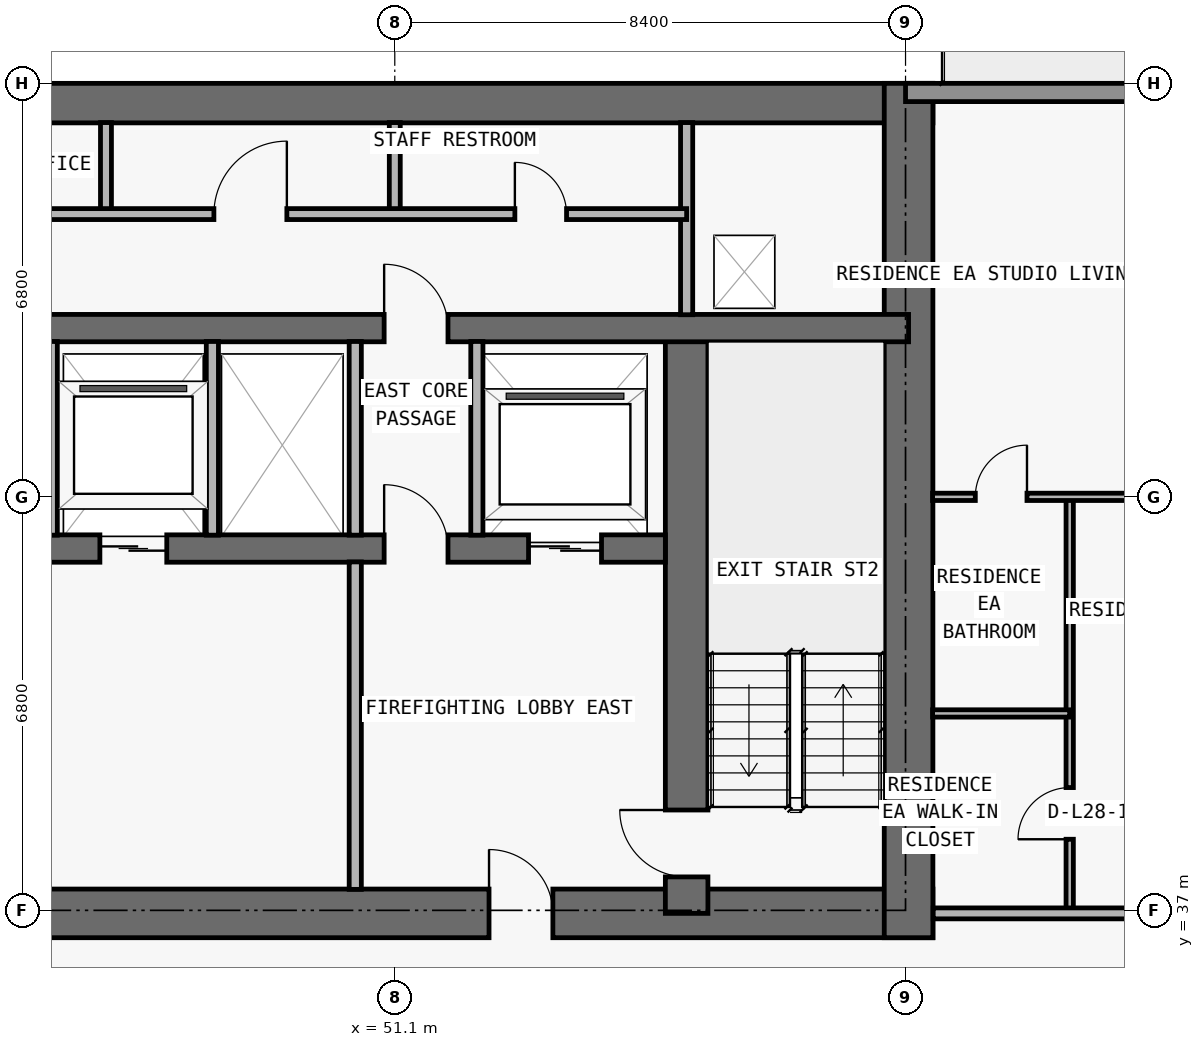
"""IFC4 building model, lengths in metres.
Left out: names, types, materials, properties, quantities, classifications, styles, units other than length and angle.
Written with IfcOpenShell. Run it as: python <this file> out.ifc"""

import sys

from ifc_helpers import new_model, si_unit, direction, frame, frame_2d, origin, place, context, subcontext, project, spatial, rectangle, extrude, element, fill, save


model = new_model("IFC4")
c1 = context("Model", 3, precision=1e-05, world=origin(), true_north=direction((0.0, 1.0)))
c2 = subcontext(c1, "Body", "Model", "MODEL_VIEW")
j1 = project(units=[si_unit("LENGTHUNIT", "METRE"), si_unit("PLANEANGLEUNIT", "RADIAN")], contexts=[c1])
p1 = place(None, origin())
s1 = spatial("IfcSite", under=j1, at=p1, CompositionType="ELEMENT")
p2 = place(p1, origin())
s2 = spatial("IfcBuilding", under=s1, at=p2, CompositionType="ELEMENT")
p3 = place(p2, frame((0.0, 0.0, 105.9)))
s3 = spatial("IfcBuildingStorey", under=s2, at=p3, CompositionType="ELEMENT", Elevation=105.9)
p4 = place(p3, frame((17.85, 36.95, 0.0), z_axis=(0.0, 0.0, 1.0), x_axis=(1.0, 0.0, 0.0)))
e1 = element("IfcWall", 1, at=p4, inside=s3, PredefinedType="SHEAR", context=c2, shape_type="SweptSolid", body=[
    extrude(rectangle(XDim=42.1, YDim=0.8, at=frame_2d((21.05, 0.0))), origin(), (0.0, 0.0, 1.0), 3.05),
])
p5 = place(p4, frame((14.45, 0.0, 0.0)))
e2 = element("IfcOpeningElement", 2, at=p5, cuts=e1, PredefinedType="OPENING", context=c2, shape_type="SweptSolid", body=[
    extrude(rectangle(XDim=1.1, YDim=2.15, at=frame_2d((0.55, 1.075))), frame((0.0, 0.41, 0.0), z_axis=(0.0, -1.0, 0.0), x_axis=(1.0, 0.0, 0.0)), (0.0, 0.0, 1.0), 0.82),
])
p6 = place(p4, frame((6.3, 0.0, 0.0)))
e3 = element("IfcOpeningElement", 3, at=p6, cuts=e1, PredefinedType="OPENING", context=c2, shape_type="SweptSolid", body=[
    extrude(rectangle(XDim=1.05, YDim=2.15, at=frame_2d((0.525, 1.075))), frame((0.0, 0.41, 0.0), z_axis=(0.0, -1.0, 0.0), x_axis=(1.0, 0.0, 0.0)), (0.0, 0.0, 1.0), 0.82),
])
p7 = place(p4, frame((34.8, 0.0, 0.0)))
e4 = element("IfcOpeningElement", 4, at=p7, cuts=e1, PredefinedType="OPENING", context=c2, shape_type="SweptSolid", body=[
    extrude(rectangle(XDim=1.05, YDim=2.15, at=frame_2d((0.525, 1.075))), frame((0.0, 0.41, 0.0), z_axis=(0.0, -1.0, 0.0), x_axis=(1.0, 0.0, 0.0)), (0.0, 0.0, 1.0), 0.82),
])
p8 = place(p4, frame((10.913, 0.0, 0.0)))
e5 = element("IfcOpeningElement", 5, at=p8, cuts=e1, PredefinedType="OPENING", context=c2, shape_type="SweptSolid", body=[
    extrude(rectangle(XDim=1.05, YDim=2.15, at=frame_2d((0.525, 1.075))), frame((0.0, 0.41, 0.0), z_axis=(0.0, -1.0, 0.0), x_axis=(1.0, 0.0, 0.0)), (0.0, 0.0, 1.0), 0.82),
])
p9 = place(p4, frame((24.15, 0.0, 0.0)))
e6 = element("IfcOpeningElement", 6, at=p9, cuts=e1, PredefinedType="OPENING", context=c2, shape_type="SweptSolid", body=[
    extrude(rectangle(XDim=1.05, YDim=2.15, at=frame_2d((0.525, 1.075))), frame((0.0, 0.41, 0.0), z_axis=(0.0, -1.0, 0.0), x_axis=(1.0, 0.0, 0.0)), (0.0, 0.0, 1.0), 0.82),
])
p10 = place(p3, frame((17.85, 50.275, 0.0), z_axis=(0.0, 0.0, 1.0), x_axis=(1.0, 0.0, 0.0)))
e7 = element("IfcWall", 7, at=p10, inside=s3, PredefinedType="SHEAR", context=c2, shape_type="SweptSolid", body=[
    extrude(rectangle(XDim=42.1, YDim=0.65, at=frame_2d((21.05, 0.0))), origin(), (0.0, 0.0, 1.0), 3.05),
])
p11 = place(p3, frame((59.55, 36.55, 0.0), z_axis=(0.0, 0.0, 1.0), x_axis=(0.0, 1.0, 0.0)))
e8 = element("IfcWall", 8, at=p11, inside=s3, PredefinedType="SHEAR", context=c2, shape_type="SweptSolid", body=[
    extrude(rectangle(XDim=14.05, YDim=0.8, at=frame_2d((7.025, 0.0))), origin(), (0.0, 0.0, 1.0), 3.05),
])
p12 = place(p3, frame((55.9, 36.95, 0.0), z_axis=(0.0, 0.0, 1.0), x_axis=(0.0, 1.0, 0.0)))
e9 = element("IfcWall", 9, at=p12, inside=s3, PredefinedType="SHEAR", context=c2, shape_type="SweptSolid", body=[
    extrude(rectangle(XDim=9.625, YDim=0.7, at=frame_2d((4.812, 0.0))), origin(), (0.0, 0.0, 1.0), 3.05),
])
p13 = place(p12, frame((0.6, 0.0, 0.0)))
e10 = element("IfcOpeningElement", 10, at=p13, cuts=e9, PredefinedType="OPENING", context=c2, shape_type="SweptSolid", body=[
    extrude(rectangle(XDim=1.1, YDim=2.15, at=frame_2d((0.55, 1.075))), frame((0.0, 0.36, 0.0), z_axis=(0.0, -1.0, 0.0), x_axis=(1.0, 0.0, 0.0)), (0.0, 0.0, 1.0), 0.72),
])
p14 = place(p3, frame((22.25, 42.95, 0.0), z_axis=(0.0, 0.0, 1.0), x_axis=(1.0, 0.0, 0.0)))
e11 = element("IfcWall", 11, at=p14, inside=s3, PredefinedType="SHEAR", context=c2, shape_type="SweptSolid", body=[
    extrude(rectangle(XDim=33.3, YDim=0.45, at=frame_2d((16.65, 0.0))), origin(), (0.0, 0.0, 1.0), 3.05),
])
p15 = place(p14, frame((1.05, 0.0, 0.0)))
e12 = element("IfcOpeningElement", 12, at=p15, cuts=e11, PredefinedType="OPENING", context=c2, shape_type="SweptSolid", body=[
    extrude(rectangle(XDim=1.2, YDim=2.2, at=frame_2d((0.6, 1.1))), frame((0.0, 0.235, 0.0), z_axis=(0.0, -1.0, 0.0), x_axis=(1.0, 0.0, 0.0)), (0.0, 0.0, 1.0), 0.47),
])
p16 = place(p14, frame((31.05, 0.0, 0.0)))
e13 = element("IfcOpeningElement", 13, at=p16, cuts=e11, PredefinedType="OPENING", context=c2, shape_type="SweptSolid", body=[
    extrude(rectangle(XDim=1.2, YDim=2.2, at=frame_2d((0.6, 1.1))), frame((0.0, 0.235, 0.0), z_axis=(0.0, -1.0, 0.0), x_axis=(1.0, 0.0, 0.0)), (0.0, 0.0, 1.0), 0.47),
])
p17 = place(p14, frame((21.4, 0.0, 0.0)))
e14 = element("IfcOpeningElement", 14, at=p17, cuts=e11, PredefinedType="OPENING", context=c2, shape_type="SweptSolid", body=[
    extrude(rectangle(XDim=1.1, YDim=2.2, at=frame_2d((0.55, 1.1))), frame((0.0, 0.235, 0.0), z_axis=(0.0, -1.0, 0.0), x_axis=(1.0, 0.0, 0.0)), (0.0, 0.0, 1.0), 0.47),
])
p18 = place(p14, frame((24.0, 0.0, 0.0)))
e15 = element("IfcOpeningElement", 15, at=p18, cuts=e11, PredefinedType="OPENING", context=c2, shape_type="SweptSolid", body=[
    extrude(rectangle(XDim=1.1, YDim=2.2, at=frame_2d((0.55, 1.1))), frame((0.0, 0.235, 0.0), z_axis=(0.0, -1.0, 0.0), x_axis=(1.0, 0.0, 0.0)), (0.0, 0.0, 1.0), 0.47),
])
p19 = place(p14, frame((3.625, 0.0, 0.0)))
e16 = element("IfcOpeningElement", 16, at=p19, cuts=e11, PredefinedType="OPENING", context=c2, shape_type="SweptSolid", body=[
    extrude(rectangle(XDim=1.05, YDim=2.15, at=frame_2d((0.525, 1.075))), frame((0.0, 0.235, 0.0), z_axis=(0.0, -1.0, 0.0), x_axis=(1.0, 0.0, 0.0)), (0.0, 0.0, 1.0), 0.47),
])
p20 = place(p14, frame((28.675, 0.0, 0.0)))
e17 = element("IfcOpeningElement", 17, at=p20, cuts=e11, PredefinedType="OPENING", context=c2, shape_type="SweptSolid", body=[
    extrude(rectangle(XDim=1.05, YDim=2.15, at=frame_2d((0.525, 1.075))), frame((0.0, 0.235, 0.0), z_axis=(0.0, -1.0, 0.0), x_axis=(1.0, 0.0, 0.0)), (0.0, 0.0, 1.0), 0.47),
])
p21 = place(p14, frame((13.925, 0.0, 0.0)))
e18 = element("IfcOpeningElement", 18, at=p21, cuts=e11, PredefinedType="OPENING", context=c2, shape_type="SweptSolid", body=[
    extrude(rectangle(XDim=1.0, YDim=2.2, at=frame_2d((0.5, 1.1))), frame((0.0, 0.235, 0.0), z_axis=(0.0, -1.0, 0.0), x_axis=(1.0, 0.0, 0.0)), (0.0, 0.0, 1.0), 0.47),
])
p22 = place(p14, frame((18.05, 0.0, 0.0)))
e19 = element("IfcOpeningElement", 19, at=p22, cuts=e11, PredefinedType="OPENING", context=c2, shape_type="SweptSolid", body=[
    extrude(rectangle(XDim=1.0, YDim=2.2, at=frame_2d((0.5, 1.1))), frame((0.0, 0.235, 0.0), z_axis=(0.0, -1.0, 0.0), x_axis=(1.0, 0.0, 0.0)), (0.0, 0.0, 1.0), 0.47),
])
p23 = place(p3, frame((18.25, 46.575, 0.0), z_axis=(0.0, 0.0, 1.0), x_axis=(1.0, 0.0, 0.0)))
e20 = element("IfcWall", 20, at=p23, inside=s3, PredefinedType="SHEAR", context=c2, shape_type="SweptSolid", body=[
    extrude(rectangle(XDim=41.3, YDim=0.45, at=frame_2d((20.65, 0.0))), origin(), (0.0, 0.0, 1.0), 3.05),
])
p24 = place(p23, frame((7.625, 0.0, 0.0)))
e21 = element("IfcOpeningElement", 21, at=p24, cuts=e20, PredefinedType="OPENING", context=c2, shape_type="SweptSolid", body=[
    extrude(rectangle(XDim=1.05, YDim=2.15, at=frame_2d((0.525, 1.075))), frame((0.0, 0.235, 0.0), z_axis=(0.0, -1.0, 0.0), x_axis=(1.0, 0.0, 0.0)), (0.0, 0.0, 1.0), 0.47),
])
p25 = place(p23, frame((32.675, 0.0, 0.0)))
e22 = element("IfcOpeningElement", 22, at=p25, cuts=e20, PredefinedType="OPENING", context=c2, shape_type="SweptSolid", body=[
    extrude(rectangle(XDim=1.05, YDim=2.15, at=frame_2d((0.525, 1.075))), frame((0.0, 0.235, 0.0), z_axis=(0.0, -1.0, 0.0), x_axis=(1.0, 0.0, 0.0)), (0.0, 0.0, 1.0), 0.47),
])
p26 = place(p3, frame((59.5, 50.45, 0.0), z_axis=(0.0, 0.0, 1.0), x_axis=(1.0, 0.0, 0.0)))
e23 = element("IfcWall", 23, at=p26, inside=s3, PredefinedType="STANDARD", context=c2, shape_type="SweptSolid", body=[
    extrude(rectangle(XDim=10.6, YDim=0.3, at=frame_2d((5.3, 0.0))), origin(), (0.0, 0.0, 1.0), 3.05),
])
p27 = place(p26, frame((4.3, 0.0, 0.0)))
e24 = element("IfcOpeningElement", 24, at=p27, cuts=e23, PredefinedType="OPENING", context=c2, shape_type="SweptSolid", body=[
    extrude(rectangle(XDim=2.0, YDim=2.3, at=frame_2d((1.0, 1.15))), frame((0.0, 0.16, 0.0), z_axis=(0.0, -1.0, 0.0), x_axis=(1.0, 0.0, 0.0)), (0.0, 0.0, 1.0), 0.32),
])
p28 = place(p3, frame((45.45, 43.17, 0.0), z_axis=(0.0, 0.0, 1.0), x_axis=(0.0, 1.0, 0.0)))
e25 = element("IfcWall", 25, at=p28, inside=s3, PredefinedType="PARTITIONING", context=c2, shape_type="SweptSolid", body=[
    extrude(rectangle(XDim=3.185, YDim=0.2, at=frame_2d((1.593, 0.0))), origin(), (0.0, 0.0, 1.0), 3.05),
])
p29 = place(p3, frame((46.35, 48.45, 0.0), z_axis=(0.0, 0.0, 1.0), x_axis=(0.0, 1.0, 0.0)))
e26 = element("IfcWall", 26, at=p29, inside=s3, PredefinedType="PARTITIONING", context=c2, shape_type="SweptSolid", body=[
    extrude(rectangle(XDim=1.505, YDim=0.18, at=frame_2d((0.752, 0.0))), origin(), (0.0, 0.0, 1.0), 3.05),
])
p30 = place(p3, frame((48.1, 43.17, 0.0), z_axis=(0.0, 0.0, 1.0), x_axis=(0.0, 1.0, 0.0)))
e27 = element("IfcWall", 27, at=p30, inside=s3, PredefinedType="PARTITIONING", context=c2, shape_type="SweptSolid", body=[
    extrude(rectangle(XDim=3.185, YDim=0.2, at=frame_2d((1.593, 0.0))), origin(), (0.0, 0.0, 1.0), 3.05),
])
p31 = place(p3, frame((50.45, 37.345, 0.0), z_axis=(0.0, 0.0, 1.0), x_axis=(0.0, 1.0, 0.0)))
e28 = element("IfcWall", 28, at=p31, inside=s3, PredefinedType="PARTITIONING", context=c2, shape_type="SweptSolid", body=[
    extrude(rectangle(XDim=5.385, YDim=0.2, at=frame_2d((2.692, 0.0))), origin(), (0.0, 0.0, 1.0), 3.05),
])
p32 = place(p3, frame((50.45, 43.17, 0.0), z_axis=(0.0, 0.0, 1.0), x_axis=(0.0, 1.0, 0.0)))
e29 = element("IfcWall", 29, at=p32, inside=s3, PredefinedType="PARTITIONING", context=c2, shape_type="SweptSolid", body=[
    extrude(rectangle(XDim=3.185, YDim=0.2, at=frame_2d((1.593, 0.0))), origin(), (0.0, 0.0, 1.0), 3.05),
])
p33 = place(p3, frame((51.1, 48.45, 0.0), z_axis=(0.0, 0.0, 1.0), x_axis=(0.0, 1.0, 0.0)))
e30 = element("IfcWall", 30, at=p33, inside=s3, PredefinedType="PARTITIONING", context=c2, shape_type="SweptSolid", body=[
    extrude(rectangle(XDim=1.505, YDim=0.18, at=frame_2d((0.752, 0.0))), origin(), (0.0, 0.0, 1.0), 3.05),
])
p34 = place(p3, frame((52.45, 43.17, 0.0), z_axis=(0.0, 0.0, 1.0), x_axis=(0.0, 1.0, 0.0)))
e31 = element("IfcWall", 31, at=p34, inside=s3, PredefinedType="PARTITIONING", context=c2, shape_type="SweptSolid", body=[
    extrude(rectangle(XDim=3.185, YDim=0.2, at=frame_2d((1.593, 0.0))), origin(), (0.0, 0.0, 1.0), 3.05),
])
p35 = place(p3, frame((55.9, 46.795, 0.0), z_axis=(0.0, 0.0, 1.0), x_axis=(0.0, 1.0, 0.0)))
e32 = element("IfcWall", 32, at=p35, inside=s3, PredefinedType="PARTITIONING", context=c2, shape_type="SweptSolid", body=[
    extrude(rectangle(XDim=3.16, YDim=0.2, at=frame_2d((1.58, 0.0))), origin(), (0.0, 0.0, 1.0), 3.05),
])
p36 = place(p3, frame((62.2, 36.95, 0.0), z_axis=(0.0, 0.0, 1.0), x_axis=(0.0, 1.0, 0.0)))
e33 = element("IfcWall", 33, at=p36, inside=s3, PredefinedType="PARTITIONING", context=c2, shape_type="SweptSolid", body=[
    extrude(rectangle(XDim=6.85, YDim=0.12, at=frame_2d((3.425, 0.0))), origin(), (0.0, 0.0, 1.0), 2.499),
])
p37 = place(p36, frame((1.219, 0.0, 0.0)))
e34 = element("IfcOpeningElement", 34, at=p37, cuts=e33, PredefinedType="OPENING", context=c2, shape_type="SweptSolid", body=[
    extrude(rectangle(XDim=0.85, YDim=2.1, at=frame_2d((0.425, 1.05))), frame((0.0, 0.07, 0.0), z_axis=(0.0, -1.0, 0.0), x_axis=(1.0, 0.0, 0.0)), (0.0, 0.0, 1.0), 0.14),
])
p38 = place(p3, frame((59.955, 36.95, 0.0), z_axis=(0.0, 0.0, 1.0), x_axis=(1.0, 0.0, 0.0)))
e35 = element("IfcWall", 35, at=p38, inside=s3, PredefinedType="PARTITIONING", context=c2, shape_type="SweptSolid", body=[
    extrude(rectangle(XDim=10.145, YDim=0.18, at=frame_2d((5.073, 0.0))), origin(), (0.0, 0.0, 1.0), 3.05),
])
p39 = place(p38, frame((3.957, 0.0, 0.0)))
e36 = element("IfcOpeningElement", 36, at=p39, cuts=e35, PredefinedType="OPENING", context=c2, shape_type="SweptSolid", body=[
    extrude(rectangle(XDim=1.0, YDim=2.2, at=frame_2d((0.5, 1.1))), frame((0.0, 0.1, 0.0), z_axis=(0.0, -1.0, 0.0), x_axis=(1.0, 0.0, 0.0)), (0.0, 0.0, 1.0), 0.2),
])
p40 = place(p3, frame((59.945, 40.238, 0.0), z_axis=(0.0, 0.0, 1.0), x_axis=(1.0, 0.0, 0.0)))
e37 = element("IfcWall", 37, at=p40, inside=s3, PredefinedType="PARTITIONING", context=c2, shape_type="SweptSolid", body=[
    extrude(rectangle(XDim=2.255, YDim=0.12, at=frame_2d((1.127, 0.0))), origin(), (0.0, 0.0, 1.0), 3.05),
])
p41 = place(p3, frame((59.945, 43.8, 0.0), z_axis=(0.0, 0.0, 1.0), x_axis=(1.0, 0.0, 0.0)))
e38 = element("IfcWall", 38, at=p41, inside=s3, PredefinedType="PARTITIONING", context=c2, shape_type="SweptSolid", body=[
    extrude(rectangle(XDim=13.66, YDim=0.12, at=frame_2d((6.83, 0.0))), origin(), (0.0, 0.0, 1.0), 2.339),
])
p42 = place(p41, frame((4.017, 0.0, 0.0)))
e39 = element("IfcOpeningElement", 39, at=p42, cuts=e38, PredefinedType="OPENING", context=c2, shape_type="SweptSolid", body=[
    extrude(rectangle(XDim=0.9, YDim=2.15, at=frame_2d((0.45, 1.075))), frame((0.0, 0.07, 0.0), z_axis=(0.0, -1.0, 0.0), x_axis=(1.0, 0.0, 0.0)), (0.0, 0.0, 1.0), 0.14),
])
p43 = place(p41, frame((0.702, 0.0, 0.0)))
e40 = element("IfcOpeningElement", 40, at=p43, cuts=e38, PredefinedType="OPENING", context=c2, shape_type="SweptSolid", body=[
    extrude(rectangle(XDim=0.85, YDim=2.1, at=frame_2d((0.425, 1.05))), frame((0.0, 0.07, 0.0), z_axis=(0.0, -1.0, 0.0), x_axis=(1.0, 0.0, 0.0)), (0.0, 0.0, 1.0), 0.14),
])
p44 = place(p3, frame((26.7, 48.45, 0.0), z_axis=(0.0, 0.0, 1.0), x_axis=(1.0, 0.0, 0.0)))
e41 = element("IfcWall", 41, at=p44, inside=s3, PredefinedType="PARTITIONING", context=c2, shape_type="SweptSolid", body=[
    extrude(rectangle(XDim=29.2, YDim=0.18, at=frame_2d((14.6, 0.0))), origin(), (0.0, 0.0, 1.0), 3.05),
])
p45 = place(p44, frame((1.75, 0.0, 0.0)))
e42 = element("IfcOpeningElement", 42, at=p45, cuts=e41, PredefinedType="OPENING", context=c2, shape_type="SweptSolid", body=[
    extrude(rectangle(XDim=1.2, YDim=2.2, at=frame_2d((0.6, 1.1))), frame((0.0, 0.1, 0.0), z_axis=(0.0, -1.0, 0.0), x_axis=(1.0, 0.0, 0.0)), (0.0, 0.0, 1.0), 0.2),
])
p46 = place(p44, frame((6.475, 0.0, 0.0)))
e43 = element("IfcOpeningElement", 43, at=p46, cuts=e41, PredefinedType="OPENING", context=c2, shape_type="SweptSolid", body=[
    extrude(rectangle(XDim=1.2, YDim=2.2, at=frame_2d((0.6, 1.1))), frame((0.0, 0.1, 0.0), z_axis=(0.0, -1.0, 0.0), x_axis=(1.0, 0.0, 0.0)), (0.0, 0.0, 1.0), 0.2),
])
p47 = place(p44, frame((14.05, 0.0, 0.0)))
e44 = element("IfcOpeningElement", 44, at=p47, cuts=e41, PredefinedType="OPENING", context=c2, shape_type="SweptSolid", body=[
    extrude(rectangle(XDim=1.0, YDim=2.2, at=frame_2d((0.5, 1.1))), frame((0.0, 0.1, 0.0), z_axis=(0.0, -1.0, 0.0), x_axis=(1.0, 0.0, 0.0)), (0.0, 0.0, 1.0), 0.2),
])
p48 = place(p44, frame((21.425, 0.0, 0.0)))
e45 = element("IfcOpeningElement", 45, at=p48, cuts=e41, PredefinedType="OPENING", context=c2, shape_type="SweptSolid", body=[
    extrude(rectangle(XDim=1.2, YDim=2.2, at=frame_2d((0.6, 1.1))), frame((0.0, 0.1, 0.0), z_axis=(0.0, -1.0, 0.0), x_axis=(1.0, 0.0, 0.0)), (0.0, 0.0, 1.0), 0.2),
])
p49 = place(p44, frame((26.375, 0.0, 0.0)))
e46 = element("IfcOpeningElement", 46, at=p49, cuts=e41, PredefinedType="OPENING", context=c2, shape_type="SweptSolid", body=[
    extrude(rectangle(XDim=0.85, YDim=2.1, at=frame_2d((0.425, 1.05))), frame((0.0, 0.1, 0.0), z_axis=(0.0, -1.0, 0.0), x_axis=(1.0, 0.0, 0.0)), (0.0, 0.0, 1.0), 0.2),
])
p50 = place(p16, origin())
e47 = element("IfcDoor", 47, at=p50, inside=s3, OperationType="DOUBLE_DOOR_SLIDING", PredefinedType="DOOR", context=c2, shape_type="SweptSolid", body=[
    extrude(rectangle(XDim=1.2, YDim=2.2, at=frame_2d((0.6, 1.1))), frame((0.0, 0.025, 0.0), z_axis=(0.0, -1.0, 0.0), x_axis=(1.0, 0.0, 0.0)), (0.0, 0.0, 1.0), 0.05),
])
fill(e13, e47)
p51 = place(p18, origin())
e48 = element("IfcDoor", 48, at=p51, inside=s3, OperationType="DOUBLE_DOOR_SLIDING", PredefinedType="DOOR", context=c2, shape_type="SweptSolid", body=[
    extrude(rectangle(XDim=1.1, YDim=2.2, at=frame_2d((0.55, 1.1))), frame((0.0, 0.025, 0.0), z_axis=(0.0, -1.0, 0.0), x_axis=(1.0, 0.0, 0.0)), (0.0, 0.0, 1.0), 0.05),
])
fill(e15, e48)
p52 = place(p7, origin())
e49 = element("IfcDoor", 49, at=p52, inside=s3, OperationType="SINGLE_SWING_LEFT", PredefinedType="DOOR", context=c2, shape_type="SweptSolid", body=[
    extrude(rectangle(XDim=1.05, YDim=2.15, at=frame_2d((0.525, 1.075))), frame((0.0, 0.025, 0.0), z_axis=(0.0, -1.0, 0.0), x_axis=(1.0, 0.0, 0.0)), (0.0, 0.0, 1.0), 0.05),
])
fill(e4, e49)
p53 = place(p13, origin())
e50 = element("IfcDoor", 50, at=p53, inside=s3, OperationType="SINGLE_SWING_RIGHT", PredefinedType="DOOR", context=c2, shape_type="SweptSolid", body=[
    extrude(rectangle(XDim=1.1, YDim=2.15, at=frame_2d((0.55, 1.075))), frame((0.0, 0.025, 0.0), z_axis=(0.0, -1.0, 0.0), x_axis=(1.0, 0.0, 0.0)), (0.0, 0.0, 1.0), 0.05),
])
fill(e10, e50)
p54 = place(p20, origin())
e51 = element("IfcDoor", 51, at=p54, inside=s3, OperationType="SINGLE_SWING_LEFT", PredefinedType="DOOR", context=c2, shape_type="SweptSolid", body=[
    extrude(rectangle(XDim=1.05, YDim=2.15, at=frame_2d((0.525, 1.075))), frame((0.0, 0.025, 0.0), z_axis=(0.0, -1.0, 0.0), x_axis=(1.0, 0.0, 0.0)), (0.0, 0.0, 1.0), 0.05),
])
fill(e17, e51)
p55 = place(p25, origin())
e52 = element("IfcDoor", 52, at=p55, inside=s3, OperationType="SINGLE_SWING_LEFT", PredefinedType="DOOR", context=c2, shape_type="SweptSolid", body=[
    extrude(rectangle(XDim=1.05, YDim=2.15, at=frame_2d((0.525, 1.075))), frame((0.0, 0.025, 0.0), z_axis=(0.0, -1.0, 0.0), x_axis=(1.0, 0.0, 0.0)), (0.0, 0.0, 1.0), 0.05),
])
fill(e22, e52)
p56 = place(p48, origin())
e53 = element("IfcDoor", 53, at=p56, inside=s3, OperationType="SINGLE_SWING_RIGHT", PredefinedType="DOOR", context=c2, shape_type="SweptSolid", body=[
    extrude(rectangle(XDim=1.2, YDim=2.2, at=frame_2d((0.6, 1.1))), frame((0.0, 0.025, 0.0), z_axis=(0.0, -1.0, 0.0), x_axis=(1.0, 0.0, 0.0)), (0.0, 0.0, 1.0), 0.05),
])
fill(e45, e53)
p57 = place(p49, origin())
e54 = element("IfcDoor", 54, at=p57, inside=s3, OperationType="SINGLE_SWING_LEFT", PredefinedType="DOOR", context=c2, shape_type="SweptSolid", body=[
    extrude(rectangle(XDim=0.85, YDim=2.1, at=frame_2d((0.425, 1.05))), frame((0.0, 0.025, 0.0), z_axis=(0.0, -1.0, 0.0), x_axis=(1.0, 0.0, 0.0)), (0.0, 0.0, 1.0), 0.05),
])
fill(e46, e54)
p58 = place(p37, origin())
e55 = element("IfcDoor", 55, at=p58, inside=s3, OperationType="SINGLE_SWING_LEFT", PredefinedType="DOOR", context=c2, shape_type="SweptSolid", body=[
    extrude(rectangle(XDim=0.85, YDim=2.1, at=frame_2d((0.425, 1.05))), frame((0.0, 0.025, 0.0), z_axis=(0.0, -1.0, 0.0), x_axis=(1.0, 0.0, 0.0)), (0.0, 0.0, 1.0), 0.05),
])
fill(e34, e55)
p59 = place(p43, origin())
e56 = element("IfcDoor", 56, at=p59, inside=s3, OperationType="SINGLE_SWING_RIGHT", PredefinedType="DOOR", context=c2, shape_type="SweptSolid", body=[
    extrude(rectangle(XDim=0.85, YDim=2.1, at=frame_2d((0.425, 1.05))), frame((0.0, 0.025, 0.0), z_axis=(0.0, -1.0, 0.0), x_axis=(1.0, 0.0, 0.0)), (0.0, 0.0, 1.0), 0.05),
])
fill(e40, e56)
save(model, sys.argv[1])
